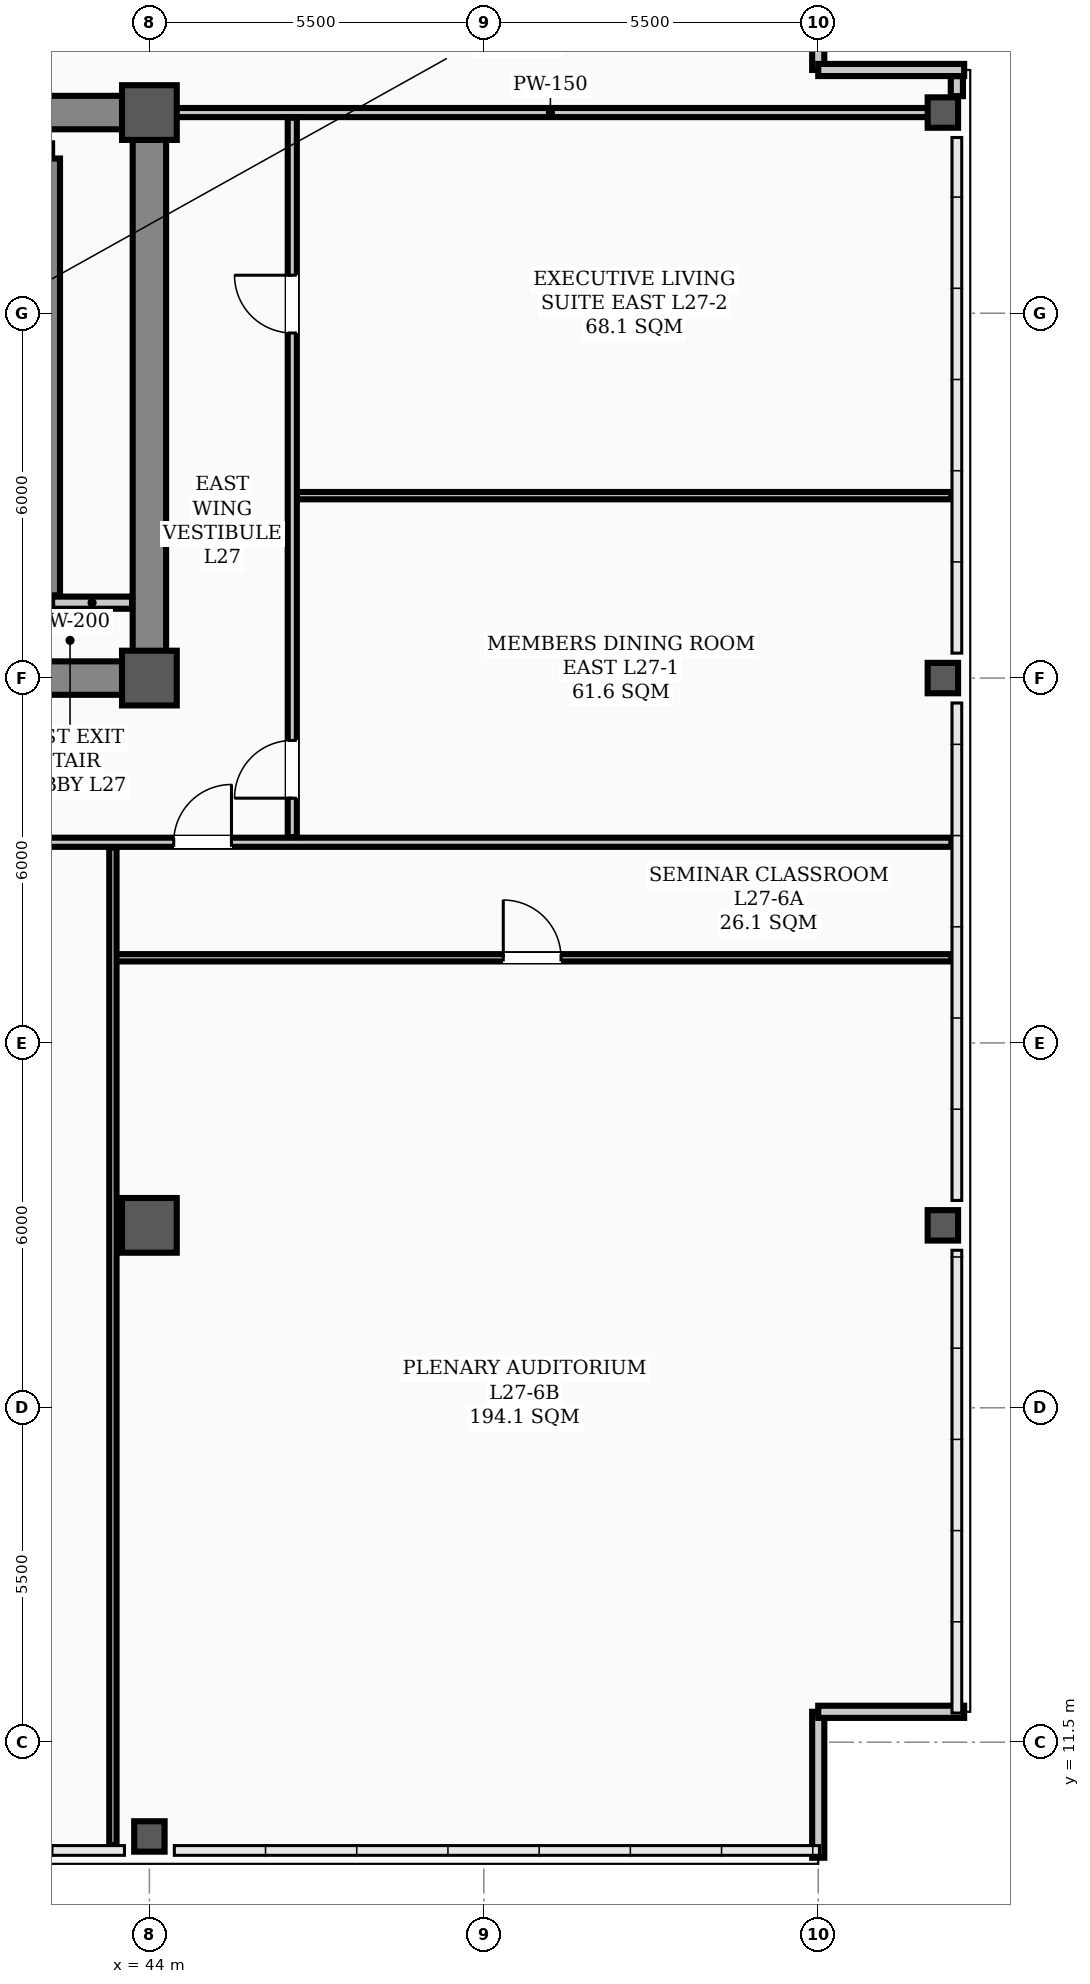
"""IFC4 building model, lengths in metres.
Left out: names, types, materials, properties, quantities, classifications, styles, units other than length and angle.
Written with IfcOpenShell. Run it as: python <this file> out.ifc"""

import sys

from ifc_helpers import new_model, si_unit, direction, frame, frame_2d, origin, origin_2d, place, context, subcontext, project, spatial, rectangle, hollow_rectangle, extrude, element, fill, save


model = new_model("IFC4")
c1 = context("Model", 3, precision=1e-05, world=origin(), true_north=direction((0.0, 1.0)))
c2 = subcontext(c1, "Body", "Model", "MODEL_VIEW")
j1 = project(units=[si_unit("LENGTHUNIT", "METRE"), si_unit("PLANEANGLEUNIT", "RADIAN")], contexts=[c1])
p1 = place(None, origin())
s1 = spatial("IfcSite", under=j1, at=p1, CompositionType="ELEMENT")
p2 = place(p1, origin())
s2 = spatial("IfcBuilding", under=s1, at=p2, CompositionType="ELEMENT")
p3 = place(p2, frame((0.0, 0.0, 111.0)))
s3 = spatial("IfcBuildingStorey", under=s2, at=p3, CompositionType="ELEMENT", Elevation=111.0)
for number, where, z_axis, x_axis in (
    (1, (44.0, 29.0, 0.0), (0.0, 0.0, 1.0), (1.0, 0.0, 0.0)),
    (2, (44.0, 38.3, 0.0), (0.0, 0.0, 1.0), (1.0, 0.0, 0.0)),
    (3, (44.0, 20.0, 0.0), (0.0, 0.0, 1.0), (1.0, 0.0, 0.0)),
):
    element("IfcColumn", number, at=place(p3, frame(where, z_axis=z_axis, x_axis=x_axis)), inside=s3, PredefinedType="COLUMN", context=c2, shape_type="SweptSolid", body=[
        extrude(hollow_rectangle(XDim=0.9, YDim=0.9, WallThickness=0.035, InnerFilletRadius=0.017, OuterFilletRadius=0.052, at=origin_2d()), origin(), (0.0, 0.0, 1.0), 3.9),
    ])
for number, where, z_axis, x_axis in (
    (4, (44.0, 9.95, 0.0), (0.0, 0.0, 1.0), (1.0, 0.0, 0.0)),
    (5, (57.05, 20.0, 0.0), (0.0, 0.0, 1.0), (1.0, 0.0, 0.0)),
    (6, (57.05, 29.0, 0.0), (0.0, 0.0, 1.0), (1.0, 0.0, 0.0)),
    (7, (57.05, 38.3, 0.0), (0.0, 0.0, 1.0), (1.0, 0.0, 0.0)),
):
    element("IfcColumn", number, at=place(p3, frame(where, z_axis=z_axis, x_axis=x_axis)), inside=s3, PredefinedType="COLUMN", context=c2, shape_type="SweptSolid", body=[
        extrude(hollow_rectangle(XDim=0.5, YDim=0.5, WallThickness=0.024, InnerFilletRadius=0.012, OuterFilletRadius=0.036, at=origin_2d()), origin(), (0.0, 0.0, 1.0), 3.66),
    ])
p4 = place(p3, frame((57.28, 38.57, 0.0), z_axis=(0.0, 0.0, 1.0), x_axis=(0.0, 1.0, 0.0)))
e8 = element("IfcWall", 8, at=p4, inside=s3, PredefinedType="PARAPET", context=c2, shape_type="SweptSolid", body=[
    extrude(rectangle(XDim=0.33, YDim=0.2, at=frame_2d((0.165, 0.0))), origin(), (0.0, 0.0, 1.0), 1.2),
])
for number, where, z_axis, x_axis in (
    (9, (55.0, 9.6, 0.0), (0.0, 0.0, 1.0), (0.0, 1.0, 0.0)),
    (10, (55.0, 12.0, 0.0), (0.0, 0.0, 1.0), (1.0, 0.0, 0.0)),
    (11, (55.0, 41.4, 0.0), (0.0, 0.0, 1.0), (0.0, -1.0, 0.0)),
    (12, (55.0, 39.0, 0.0), (0.0, 0.0, 1.0), (1.0, 0.0, 0.0)),
):
    element("IfcWall", number, at=place(p3, frame(where, z_axis=z_axis, x_axis=x_axis)), inside=s3, PredefinedType="PARAPET", context=c2, shape_type="SweptSolid", body=[
        extrude(rectangle(XDim=2.4, YDim=0.2, at=frame_2d((1.2, 0.0))), origin(), (0.0, 0.0, 1.0), 1.2),
    ])
p5 = place(p3, frame((13.5, 29.0, 0.0), z_axis=(0.0, 0.0, 1.0), x_axis=(1.0, 0.0, 0.0)))
e13 = element("IfcWall", 13, at=p5, inside=s3, PredefinedType="SHEAR", context=c2, shape_type="SweptSolid", body=[
    extrude(rectangle(XDim=30.5, YDim=0.55, at=frame_2d((15.25, 0.0))), origin(), (0.0, 0.0, 1.0), 3.66),
])
p6 = place(p5, frame((1.75, 0.0, 0.0)))
e14 = element("IfcOpeningElement", 14, at=p6, cuts=e13, PredefinedType="OPENING", context=c2, shape_type="SweptSolid", body=[
    extrude(rectangle(XDim=1.1, YDim=2.08, at=frame_2d((0.55, 1.04))), frame((0.0, 0.285, 0.0), z_axis=(0.0, -1.0, 0.0), x_axis=(1.0, 0.0, 0.0)), (0.0, 0.0, 1.0), 0.57),
])
p7 = place(p5, frame((26.7, 0.0, 0.0)))
e15 = element("IfcOpeningElement", 15, at=p7, cuts=e13, PredefinedType="OPENING", context=c2, shape_type="SweptSolid", body=[
    extrude(rectangle(XDim=1.1, YDim=2.08, at=frame_2d((0.55, 1.04))), frame((0.0, 0.285, 0.0), z_axis=(0.0, -1.0, 0.0), x_axis=(1.0, 0.0, 0.0)), (0.0, 0.0, 1.0), 0.57),
])
p8 = place(p5, frame((6.8, 0.0, 0.0)))
e16 = element("IfcOpeningElement", 16, at=p8, cuts=e13, PredefinedType="OPENING", context=c2, shape_type="SweptSolid", body=[
    extrude(rectangle(XDim=1.1, YDim=2.08, at=frame_2d((0.55, 1.04))), frame((0.0, 0.285, 0.0), z_axis=(0.0, -1.0, 0.0), x_axis=(1.0, 0.0, 0.0)), (0.0, 0.0, 1.0), 0.57),
])
p9 = place(p5, frame((13.2, 0.0, 0.0)))
e17 = element("IfcOpeningElement", 17, at=p9, cuts=e13, PredefinedType="OPENING", context=c2, shape_type="SweptSolid", body=[
    extrude(rectangle(XDim=1.6, YDim=2.08, at=frame_2d((0.8, 1.04))), frame((0.0, 0.285, 0.0), z_axis=(0.0, -1.0, 0.0), x_axis=(1.0, 0.0, 0.0)), (0.0, 0.0, 1.0), 0.57),
])
p10 = place(p5, frame((19.6, 0.0, 0.0)))
e18 = element("IfcOpeningElement", 18, at=p10, cuts=e13, PredefinedType="OPENING", context=c2, shape_type="SweptSolid", body=[
    extrude(rectangle(XDim=0.9, YDim=2.08, at=frame_2d((0.45, 1.04))), frame((0.0, 0.285, 0.0), z_axis=(0.0, -1.0, 0.0), x_axis=(1.0, 0.0, 0.0)), (0.0, 0.0, 1.0), 0.57),
])
p11 = place(p5, frame((21.6, 0.0, 0.0)))
e19 = element("IfcOpeningElement", 19, at=p11, cuts=e13, PredefinedType="OPENING", context=c2, shape_type="SweptSolid", body=[
    extrude(rectangle(XDim=0.9, YDim=2.08, at=frame_2d((0.45, 1.04))), frame((0.0, 0.285, 0.0), z_axis=(0.0, -1.0, 0.0), x_axis=(1.0, 0.0, 0.0)), (0.0, 0.0, 1.0), 0.57),
])
p12 = place(p3, frame((13.5, 38.3, 0.0), z_axis=(0.0, 0.0, 1.0), x_axis=(1.0, 0.0, 0.0)))
e20 = element("IfcWall", 20, at=p12, inside=s3, PredefinedType="SHEAR", context=c2, shape_type="SweptSolid", body=[
    extrude(rectangle(XDim=30.5, YDim=0.55, at=frame_2d((15.25, 0.0))), origin(), (0.0, 0.0, 1.0), 3.66),
])
p13 = place(p3, frame((44.0, 29.35, 0.0), z_axis=(0.0, 0.0, 1.0), x_axis=(0.0, 1.0, 0.0)))
e21 = element("IfcWall", 21, at=p13, inside=s3, PredefinedType="SHEAR", context=c2, shape_type="SweptSolid", body=[
    extrude(rectangle(XDim=8.6, YDim=0.55, at=frame_2d((4.3, 0.0))), origin(), (0.0, 0.0, 1.0), 3.66),
])
p14 = place(p3, frame((42.405, 30.36, 0.0), z_axis=(0.0, 0.0, 1.0), x_axis=(0.0, 1.0, 0.0)))
e22 = element("IfcWall", 22, at=p14, inside=s3, PredefinedType="STANDARD", context=c2, shape_type="SweptSolid", body=[
    extrude(rectangle(XDim=7.184, YDim=0.25, at=frame_2d((3.592, 0.0))), origin(), (0.0, 0.0, 1.0), 3.66),
])
p15 = place(p3, frame((42.4, 30.24, 0.0), z_axis=(0.0, 0.0, 1.0), x_axis=(1.0, 0.0, 0.0)))
e23 = element("IfcWall", 23, at=p15, inside=s3, PredefinedType="STANDARD", context=c2, shape_type="SweptSolid", body=[
    extrude(rectangle(XDim=1.315, YDim=0.2, at=frame_2d((0.658, 0.0))), origin(), (0.0, 0.0, 1.0), 2.24),
])
p16 = place(p3, frame((7.81, 26.3, 0.0), z_axis=(0.0, 0.0, 1.0), x_axis=(1.0, 0.0, 0.0)))
e24 = element("IfcWall", 24, at=p16, inside=s3, PredefinedType="PARTITIONING", context=c2, shape_type="SweptSolid", body=[
    extrude(rectangle(XDim=49.38, YDim=0.15, at=frame_2d((24.69, 0.0))), origin(), (0.0, 0.0, 1.0), 2.24),
])
p17 = place(p16, frame((6.89, 0.0, 0.0)))
e25 = element("IfcOpeningElement", 25, at=p17, cuts=e24, PredefinedType="OPENING", context=c2, shape_type="SweptSolid", body=[
    extrude(rectangle(XDim=0.95, YDim=2.08, at=frame_2d((0.475, 1.04))), frame((0.0, 0.085, 0.0), z_axis=(0.0, -1.0, 0.0), x_axis=(1.0, 0.0, 0.0)), (0.0, 0.0, 1.0), 0.17),
])
p18 = place(p16, frame((12.315, 0.0, 0.0)))
e26 = element("IfcOpeningElement", 26, at=p18, cuts=e24, PredefinedType="OPENING", context=c2, shape_type="SweptSolid", body=[
    extrude(rectangle(XDim=0.95, YDim=2.08, at=frame_2d((0.475, 1.04))), frame((0.0, 0.085, 0.0), z_axis=(0.0, -1.0, 0.0), x_axis=(1.0, 0.0, 0.0)), (0.0, 0.0, 1.0), 0.17),
])
p19 = place(p16, frame((18.815, 0.0, 0.0)))
e27 = element("IfcOpeningElement", 27, at=p19, cuts=e24, PredefinedType="OPENING", context=c2, shape_type="SweptSolid", body=[
    extrude(rectangle(XDim=0.95, YDim=2.08, at=frame_2d((0.475, 1.04))), frame((0.0, 0.085, 0.0), z_axis=(0.0, -1.0, 0.0), x_axis=(1.0, 0.0, 0.0)), (0.0, 0.0, 1.0), 0.17),
])
p20 = place(p16, frame((25.415, 0.0, 0.0)))
e28 = element("IfcOpeningElement", 28, at=p20, cuts=e24, PredefinedType="OPENING", context=c2, shape_type="SweptSolid", body=[
    extrude(rectangle(XDim=0.95, YDim=2.08, at=frame_2d((0.475, 1.04))), frame((0.0, 0.085, 0.0), z_axis=(0.0, -1.0, 0.0), x_axis=(1.0, 0.0, 0.0)), (0.0, 0.0, 1.0), 0.17),
])
p21 = place(p16, frame((31.915, 0.0, 0.0)))
e29 = element("IfcOpeningElement", 29, at=p21, cuts=e24, PredefinedType="OPENING", context=c2, shape_type="SweptSolid", body=[
    extrude(rectangle(XDim=0.95, YDim=2.08, at=frame_2d((0.475, 1.04))), frame((0.0, 0.085, 0.0), z_axis=(0.0, -1.0, 0.0), x_axis=(1.0, 0.0, 0.0)), (0.0, 0.0, 1.0), 0.17),
])
p22 = place(p16, frame((36.59, 0.0, 0.0)))
e30 = element("IfcOpeningElement", 30, at=p22, cuts=e24, PredefinedType="OPENING", context=c2, shape_type="SweptSolid", body=[
    extrude(rectangle(XDim=0.95, YDim=2.08, at=frame_2d((0.475, 1.04))), frame((0.0, 0.085, 0.0), z_axis=(0.0, -1.0, 0.0), x_axis=(1.0, 0.0, 0.0)), (0.0, 0.0, 1.0), 0.17),
])
p23 = place(p3, frame((44.0, 38.3, 0.0), z_axis=(0.0, 0.0, 1.0), x_axis=(1.0, 0.0, 0.0)))
e31 = element("IfcWall", 31, at=p23, inside=s3, PredefinedType="PARTITIONING", context=c2, shape_type="SweptSolid", body=[
    extrude(rectangle(XDim=13.19, YDim=0.15, at=frame_2d((6.595, 0.0))), origin(), (0.0, 0.0, 1.0), 2.24),
])
p24 = place(p3, frame((43.4, 24.4, 0.0), z_axis=(0.0, 0.0, 1.0), x_axis=(1.0, 0.0, 0.0)))
e32 = element("IfcWall", 32, at=p24, inside=s3, PredefinedType="PARTITIONING", context=c2, shape_type="SweptSolid", body=[
    extrude(rectangle(XDim=13.79, YDim=0.12, at=frame_2d((6.895, 0.0))), origin(), (0.0, 0.0, 1.0), 2.24),
])
p25 = place(p24, frame((6.42, 0.0, 0.0)))
e33 = element("IfcOpeningElement", 33, at=p25, cuts=e32, PredefinedType="OPENING", context=c2, shape_type="SweptSolid", body=[
    extrude(rectangle(XDim=0.95, YDim=2.08, at=frame_2d((0.475, 1.04))), frame((0.0, 0.07, 0.0), z_axis=(0.0, -1.0, 0.0), x_axis=(1.0, 0.0, 0.0)), (0.0, 0.0, 1.0), 0.14),
])
p26 = place(p3, frame((46.35, 32.0, 0.0), z_axis=(0.0, 0.0, 1.0), x_axis=(1.0, 0.0, 0.0)))
e34 = element("IfcWall", 34, at=p26, inside=s3, PredefinedType="PARTITIONING", context=c2, shape_type="SweptSolid", body=[
    extrude(rectangle(XDim=10.84, YDim=0.12, at=frame_2d((5.42, 0.0))), origin(), (0.0, 0.0, 1.0), 3.66),
])
p27 = place(p3, frame((46.35, 26.385, 0.0), z_axis=(0.0, 0.0, 1.0), x_axis=(0.0, 1.0, 0.0)))
e35 = element("IfcWall", 35, at=p27, inside=s3, PredefinedType="PARTITIONING", context=c2, shape_type="SweptSolid", body=[
    extrude(rectangle(XDim=11.83, YDim=0.15, at=frame_2d((5.915, 0.0))), origin(), (0.0, 0.0, 1.0), 2.24),
])
p28 = place(p27, frame((0.64, 0.0, 0.0)))
e36 = element("IfcOpeningElement", 36, at=p28, cuts=e35, PredefinedType="OPENING", context=c2, shape_type="SweptSolid", body=[
    extrude(rectangle(XDim=0.95, YDim=2.08, at=frame_2d((0.475, 1.04))), frame((0.0, 0.085, 0.0), z_axis=(0.0, -1.0, 0.0), x_axis=(1.0, 0.0, 0.0)), (0.0, 0.0, 1.0), 0.17),
])
p29 = place(p27, frame((8.29, 0.0, 0.0)))
e37 = element("IfcOpeningElement", 37, at=p29, cuts=e35, PredefinedType="OPENING", context=c2, shape_type="SweptSolid", body=[
    extrude(rectangle(XDim=0.95, YDim=2.08, at=frame_2d((0.475, 1.04))), frame((0.0, 0.085, 0.0), z_axis=(0.0, -1.0, 0.0), x_axis=(1.0, 0.0, 0.0)), (0.0, 0.0, 1.0), 0.17),
])
p30 = place(p3, frame((43.4, 9.81, 0.0), z_axis=(0.0, 0.0, 1.0), x_axis=(0.0, 1.0, 0.0)))
e38 = element("IfcWall", 38, at=p30, inside=s3, PredefinedType="PARTITIONING", context=c2, shape_type="SweptSolid", body=[
    extrude(rectangle(XDim=16.405, YDim=0.12, at=frame_2d((8.203, 0.0))), origin(), (0.0, 0.0, 1.0), 2.24),
])
p31 = place(p25, origin())
e39 = element("IfcDoor", 39, at=p31, inside=s3, OperationType="SINGLE_SWING_LEFT", PredefinedType="DOOR", context=c2, shape_type="SweptSolid", body=[
    extrude(rectangle(XDim=0.95, YDim=2.08, at=frame_2d((0.475, 1.04))), frame((0.0, 0.025, 0.0), z_axis=(0.0, -1.0, 0.0), x_axis=(1.0, 0.0, 0.0)), (0.0, 0.0, 1.0), 0.05),
])
fill(e33, e39)
p32 = place(p22, origin())
e40 = element("IfcDoor", 40, at=p32, inside=s3, OperationType="SINGLE_SWING_RIGHT", PredefinedType="DOOR", context=c2, shape_type="SweptSolid", body=[
    extrude(rectangle(XDim=0.95, YDim=2.08, at=frame_2d((0.475, 1.04))), frame((0.0, 0.025, 0.0), z_axis=(0.0, -1.0, 0.0), x_axis=(1.0, 0.0, 0.0)), (0.0, 0.0, 1.0), 0.05),
])
fill(e30, e40)
p33 = place(p28, origin())
e41 = element("IfcDoor", 41, at=p33, inside=s3, OperationType="SINGLE_SWING_LEFT", PredefinedType="DOOR", context=c2, shape_type="SweptSolid", body=[
    extrude(rectangle(XDim=0.95, YDim=2.08, at=frame_2d((0.475, 1.04))), frame((0.0, 0.025, 0.0), z_axis=(0.0, -1.0, 0.0), x_axis=(1.0, 0.0, 0.0)), (0.0, 0.0, 1.0), 0.05),
])
fill(e36, e41)
p34 = place(p29, origin())
e42 = element("IfcDoor", 42, at=p34, inside=s3, OperationType="SINGLE_SWING_RIGHT", PredefinedType="DOOR", context=c2, shape_type="SweptSolid", body=[
    extrude(rectangle(XDim=0.95, YDim=2.08, at=frame_2d((0.475, 1.04))), frame((0.0, 0.025, 0.0), z_axis=(0.0, -1.0, 0.0), x_axis=(1.0, 0.0, 0.0)), (0.0, 0.0, 1.0), 0.05),
])
fill(e37, e42)
save(model, sys.argv[1])
